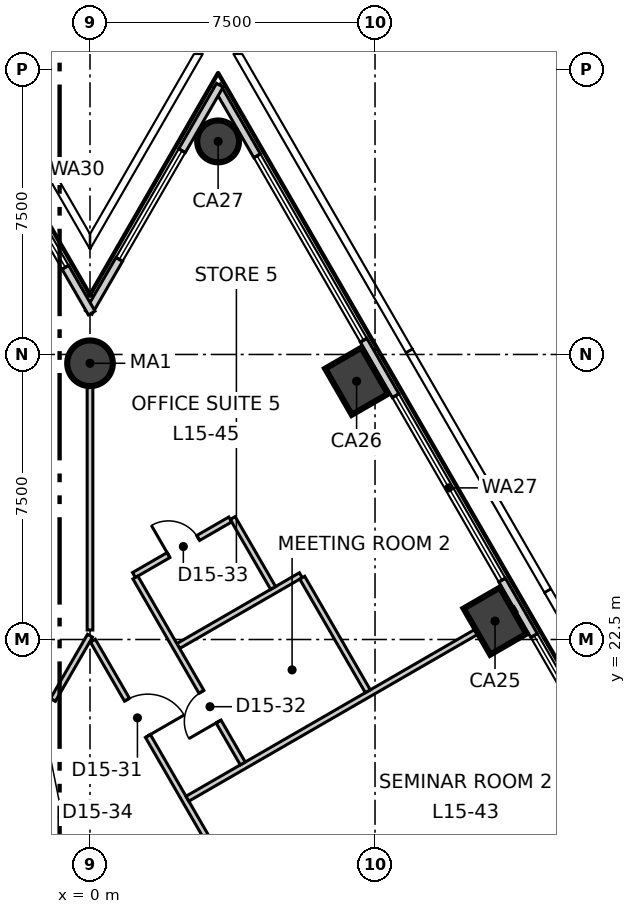
"""IFC4 building model, lengths in metres.
Left out: names, types, materials, properties, quantities, classifications, styles, units other than length and angle.
Written with IfcOpenShell. Run it as: python <this file> out.ifc"""

import sys

from ifc_helpers import new_model, si_unit, direction, frame, frame_2d, origin, origin_2d, place, context, subcontext, project, spatial, rectangle, circle, extrude, element, fill, save


model = new_model("IFC4")
c1 = context("Model", 3, precision=1e-05, world=origin(), true_north=direction((0.0, 1.0)))
c2 = subcontext(c1, "Body", "Model", "MODEL_VIEW")
j1 = project(units=[si_unit("LENGTHUNIT", "METRE"), si_unit("PLANEANGLEUNIT", "RADIAN")], contexts=[c1])
p1 = place(None, origin())
s1 = spatial("IfcSite", under=j1, at=p1, CompositionType="ELEMENT")
p2 = place(p1, origin())
s2 = spatial("IfcBuilding", under=s1, at=p2, CompositionType="ELEMENT")
p3 = place(p2, frame((0.0, 0.0, 71.3)))
s3 = spatial("IfcBuildingStorey", under=s2, at=p3, CompositionType="ELEMENT", Elevation=71.3)
for number, where, z_axis, x_axis in (
    (1, (10.658, 22.984, -0.3), (0.0, 0.0, 1.0), (-0.5, 0.866, 0.0)),
    (2, (7.015, 29.295, -0.3), (0.0, 0.0, 1.0), (-0.5, 0.866, 0.0)),
):
    element("IfcColumn", number, at=place(p3, frame(where, z_axis=z_axis, x_axis=x_axis)), inside=s3, PredefinedType="COLUMN", context=c2, shape_type="SweptSolid", body=[
        extrude(rectangle(XDim=1.4, YDim=1.1, at=origin_2d()), origin(), (0.0, 0.0, 1.0), 4.0),
    ])
p4 = place(p3, frame((3.371, 35.606, -0.3), z_axis=(0.0, 0.0, 1.0), x_axis=(-0.5, 0.866025403784, 0.0)))
e3 = element("IfcColumn", 3, at=p4, inside=s3, PredefinedType="COLUMN", context=c2, shape_type="SweptSolid", body=[
    extrude(circle(Radius=0.55, at=origin_2d()), origin(), (0.0, 0.0, 1.0), 4.0),
])
p5 = place(p3, frame((0.0, 29.768, -0.3), z_axis=(0.0, 0.0, 1.0), x_axis=(1.0, 0.0, 0.0)))
e4 = element("IfcColumn", 4, at=p5, inside=s3, PredefinedType="COLUMN", context=c2, shape_type="SweptSolid", body=[
    extrude(circle(Radius=0.6, at=origin_2d()), origin(), (0.0, 0.0, 1.0), 4.0),
])
p6 = place(p3, frame((33.779, -15.662, 0.0), z_axis=(0.0, 0.0, 1.0), x_axis=(-0.500000131003, 0.86602532815, 0.0)))
e5 = element("IfcWall", 5, at=p6, inside=s3, PredefinedType="ELEMENTEDWALL", context=c2, shape_type="SweptSolid", body=[
    extrude(rectangle(XDim=60.886, YDim=0.2, at=frame_2d((30.443, 0.0))), origin(), (0.0, 0.0, 1.0), 3.7),
])
p7 = place(p6, frame((2.147, 0.0, 0.9)))
e6 = element("IfcOpeningElement", 6, at=p7, cuts=e5, PredefinedType="OPENING", context=c2, shape_type="SweptSolid", body=[
    extrude(rectangle(XDim=5.6, YDim=2.5, at=frame_2d((2.8, 1.25))), frame((0.0, 0.11, 0.0), z_axis=(0.0, -1.0, 0.0), x_axis=(1.0, 0.0, 0.0)), (0.0, 0.0, 1.0), 0.22),
])
p8 = place(p6, frame((9.434, 0.0, 0.9)))
e7 = element("IfcOpeningElement", 7, at=p8, cuts=e5, PredefinedType="OPENING", context=c2, shape_type="SweptSolid", body=[
    extrude(rectangle(XDim=5.6, YDim=2.5, at=frame_2d((2.8, 1.25))), frame((0.0, 0.11, 0.0), z_axis=(0.0, -1.0, 0.0), x_axis=(1.0, 0.0, 0.0)), (0.0, 0.0, 1.0), 0.22),
])
p9 = place(p6, frame((16.722, 0.0, 0.9)))
e8 = element("IfcOpeningElement", 8, at=p9, cuts=e5, PredefinedType="OPENING", context=c2, shape_type="SweptSolid", body=[
    extrude(rectangle(XDim=5.6, YDim=2.5, at=frame_2d((2.8, 1.25))), frame((0.0, 0.11, 0.0), z_axis=(0.0, -1.0, 0.0), x_axis=(1.0, 0.0, 0.0)), (0.0, 0.0, 1.0), 0.22),
])
p10 = place(p6, frame((24.009, 0.0, 0.9)))
e9 = element("IfcOpeningElement", 9, at=p10, cuts=e5, PredefinedType="OPENING", context=c2, shape_type="SweptSolid", body=[
    extrude(rectangle(XDim=5.6, YDim=2.5, at=frame_2d((2.8, 1.25))), frame((0.0, 0.11, 0.0), z_axis=(0.0, -1.0, 0.0), x_axis=(1.0, 0.0, 0.0)), (0.0, 0.0, 1.0), 0.22),
])
p11 = place(p6, frame((31.297, 0.0, 0.9)))
e10 = element("IfcOpeningElement", 10, at=p11, cuts=e5, PredefinedType="OPENING", context=c2, shape_type="SweptSolid", body=[
    extrude(rectangle(XDim=5.6, YDim=2.5, at=frame_2d((2.8, 1.25))), frame((0.0, 0.11, 0.0), z_axis=(0.0, -1.0, 0.0), x_axis=(1.0, 0.0, 0.0)), (0.0, 0.0, 1.0), 0.22),
])
p12 = place(p6, frame((38.584, 0.0, 0.9)))
e11 = element("IfcOpeningElement", 11, at=p12, cuts=e5, PredefinedType="OPENING", context=c2, shape_type="SweptSolid", body=[
    extrude(rectangle(XDim=5.6, YDim=2.5, at=frame_2d((2.8, 1.25))), frame((0.0, 0.11, 0.0), z_axis=(0.0, -1.0, 0.0), x_axis=(1.0, 0.0, 0.0)), (0.0, 0.0, 1.0), 0.22),
])
p13 = place(p6, frame((45.872, 0.0, 0.9)))
e12 = element("IfcOpeningElement", 12, at=p13, cuts=e5, PredefinedType="OPENING", context=c2, shape_type="SweptSolid", body=[
    extrude(rectangle(XDim=5.6, YDim=2.5, at=frame_2d((2.8, 1.25))), frame((0.0, 0.11, 0.0), z_axis=(0.0, -1.0, 0.0), x_axis=(1.0, 0.0, 0.0)), (0.0, 0.0, 1.0), 0.22),
])
p14 = place(p6, frame((53.16, 0.0, 0.9)))
e13 = element("IfcOpeningElement", 13, at=p14, cuts=e5, PredefinedType="OPENING", context=c2, shape_type="SweptSolid", body=[
    extrude(rectangle(XDim=5.6, YDim=2.5, at=frame_2d((2.8, 1.25))), frame((0.0, 0.11, 0.0), z_axis=(0.0, -1.0, 0.0), x_axis=(1.0, 0.0, 0.0)), (0.0, 0.0, 1.0), 0.22),
])
p15 = place(p3, frame((3.416, 37.084, 0.0), z_axis=(0.0, 0.0, 1.0), x_axis=(-0.500008243208, -0.866020644514, 0.0)))
e14 = element("IfcWall", 14, at=p15, inside=s3, PredefinedType="ELEMENTEDWALL", context=c2, shape_type="SweptSolid", body=[
    extrude(rectangle(XDim=6.902, YDim=0.2, at=frame_2d((3.451, 0.0))), origin(), (0.0, 0.0, 1.0), 3.7),
])
p16 = place(p15, frame((1.99, 0.0, 0.9)))
e15 = element("IfcOpeningElement", 15, at=p16, cuts=e14, PredefinedType="OPENING", context=c2, shape_type="SweptSolid", body=[
    extrude(rectangle(XDim=3.3, YDim=2.5, at=frame_2d((1.65, 1.25))), frame((0.0, 0.11, 0.0), z_axis=(0.0, -1.0, 0.0), x_axis=(1.0, 0.0, 0.0)), (0.0, 0.0, 1.0), 0.22),
])
p17 = place(p3, frame((0.045, 31.09, 0.0), z_axis=(0.0, 0.0, 1.0), x_axis=(-0.500023561059, 0.866011800373, 0.0)))
e16 = element("IfcWall", 16, at=p17, inside=s3, PredefinedType="ELEMENTEDWALL", context=c2, shape_type="SweptSolid", body=[
    extrude(rectangle(XDim=6.902, YDim=0.2, at=frame_2d((3.451, 0.0))), origin(), (0.0, 0.0, 1.0), 3.7),
])
p18 = place(p17, frame((1.39, 0.0, 0.9)))
e17 = element("IfcOpeningElement", 17, at=p18, cuts=e16, PredefinedType="OPENING", context=c2, shape_type="SweptSolid", body=[
    extrude(rectangle(XDim=3.3, YDim=2.5, at=frame_2d((1.65, 1.25))), frame((0.0, 0.11, 0.0), z_axis=(0.0, -1.0, 0.0), x_axis=(1.0, 0.0, 0.0)), (0.0, 0.0, 1.0), 0.22),
])
p19 = place(p3, frame((-19.497, -11.17, 0.0), z_axis=(0.0, 0.0, 1.0), x_axis=(0.499998854553, 0.866026065108, 0.0)))
e18 = element("IfcWall", 18, at=p19, inside=s3, PredefinedType="PARTITIONING", context=c2, shape_type="SweptSolid", body=[
    extrude(rectangle(XDim=38.994, YDim=0.15, at=frame_2d((19.497, 0.0))), origin(), (0.0, 0.0, 1.0), 3.7),
])
p20 = place(p19, frame((35.944, 0.0, 0.0)))
e19 = element("IfcOpeningElement", 19, at=p20, cuts=e18, PredefinedType="OPENING", context=c2, shape_type="SweptSolid", body=[
    extrude(rectangle(XDim=1.1, YDim=2.1, at=frame_2d((0.55, 1.05))), frame((0.0, 0.085, 0.0), z_axis=(0.0, -1.0, 0.0), x_axis=(1.0, 0.0, 0.0)), (0.0, 0.0, 1.0), 0.17),
])
p21 = place(p19, frame((26.148, 0.0, 0.0)))
e20 = element("IfcOpeningElement", 20, at=p21, cuts=e18, PredefinedType="OPENING", context=c2, shape_type="SweptSolid", body=[
    extrude(rectangle(XDim=1.1, YDim=2.1, at=frame_2d((0.55, 1.05))), frame((0.0, 0.085, 0.0), z_axis=(0.0, -1.0, 0.0), x_axis=(1.0, 0.0, 0.0)), (0.0, 0.0, 1.0), 0.17),
])
p22 = place(p19, frame((8.572, 0.0, 0.0)))
e21 = element("IfcOpeningElement", 21, at=p22, cuts=e18, PredefinedType="OPENING", context=c2, shape_type="SweptSolid", body=[
    extrude(rectangle(XDim=1.1, YDim=2.1, at=frame_2d((0.55, 1.05))), frame((0.0, 0.085, 0.0), z_axis=(0.0, -1.0, 0.0), x_axis=(1.0, 0.0, 0.0)), (0.0, 0.0, 1.0), 0.17),
])
p23 = place(p19, frame((17.172, 0.0, 0.0)))
e22 = element("IfcOpeningElement", 22, at=p23, cuts=e18, PredefinedType="OPENING", context=c2, shape_type="SweptSolid", body=[
    extrude(rectangle(XDim=0.9, YDim=2.1, at=frame_2d((0.45, 1.05))), frame((0.0, 0.085, 0.0), z_axis=(0.0, -1.0, 0.0), x_axis=(1.0, 0.0, 0.0)), (0.0, 0.0, 1.0), 0.17),
])
p24 = place(p19, frame((14.172, 0.0, 0.0)))
e23 = element("IfcOpeningElement", 23, at=p24, cuts=e18, PredefinedType="OPENING", context=c2, shape_type="SweptSolid", body=[
    extrude(rectangle(XDim=0.9, YDim=2.1, at=frame_2d((0.45, 1.05))), frame((0.0, 0.085, 0.0), z_axis=(0.0, -1.0, 0.0), x_axis=(1.0, 0.0, 0.0)), (0.0, 0.0, 1.0), 0.17),
])
p25 = place(p19, frame((1.797, 0.0, 0.0)))
e24 = element("IfcOpeningElement", 24, at=p25, cuts=e18, PredefinedType="OPENING", context=c2, shape_type="SweptSolid", body=[
    extrude(rectangle(XDim=1.1, YDim=2.1, at=frame_2d((0.55, 1.05))), frame((0.0, 0.085, 0.0), z_axis=(0.0, -1.0, 0.0), x_axis=(1.0, 0.0, 0.0)), (0.0, 0.0, 1.0), 0.17),
])
p26 = place(p3, frame((0.0, 22.75, 0.0), z_axis=(0.0, 0.0, 1.0), x_axis=(0.0, 1.0, 0.0)))
e25 = element("IfcWall", 25, at=p26, inside=s3, PredefinedType="PARTITIONING", context=c2, shape_type="SweptSolid", body=[
    extrude(rectangle(XDim=7.638, YDim=0.15, at=frame_2d((3.819, 0.0))), origin(), (0.0, 0.0, 1.0), 3.1),
])
p27 = place(p3, frame((0.075, 22.47, 0.0), z_axis=(0.0, 0.0, 1.0), x_axis=(0.500002280369, -0.866024087209, 0.0)))
e26 = element("IfcWall", 26, at=p27, inside=s3, PredefinedType="PARTITIONING", context=c2, shape_type="SweptSolid", body=[
    extrude(rectangle(XDim=38.844, YDim=0.15, at=frame_2d((19.422, 0.0))), origin(), (0.0, 0.0, 1.0), 3.7),
])
p28 = place(p27, frame((35.944, 0.0, 0.0)))
e27 = element("IfcOpeningElement", 27, at=p28, cuts=e26, PredefinedType="OPENING", context=c2, shape_type="SweptSolid", body=[
    extrude(rectangle(XDim=1.1, YDim=2.1, at=frame_2d((0.55, 1.05))), frame((0.0, 0.085, 0.0), z_axis=(0.0, -1.0, 0.0), x_axis=(1.0, 0.0, 0.0)), (0.0, 0.0, 1.0), 0.17),
])
p29 = place(p27, frame((29.848, 0.0, 0.0)))
e28 = element("IfcOpeningElement", 28, at=p29, cuts=e26, PredefinedType="OPENING", context=c2, shape_type="SweptSolid", body=[
    extrude(rectangle(XDim=1.0, YDim=2.1, at=frame_2d((0.5, 1.05))), frame((0.0, 0.085, 0.0), z_axis=(0.0, -1.0, 0.0), x_axis=(1.0, 0.0, 0.0)), (0.0, 0.0, 1.0), 0.17),
])
p30 = place(p27, frame((14.46, 0.0, 0.0)))
e29 = element("IfcOpeningElement", 29, at=p30, cuts=e26, PredefinedType="OPENING", context=c2, shape_type="SweptSolid", body=[
    extrude(rectangle(XDim=1.1, YDim=2.1, at=frame_2d((0.55, 1.05))), frame((0.0, 0.085, 0.0), z_axis=(0.0, -1.0, 0.0), x_axis=(1.0, 0.0, 0.0)), (0.0, 0.0, 1.0), 0.17),
])
p31 = place(p27, frame((24.66, 0.0, 0.0)))
e30 = element("IfcOpeningElement", 30, at=p31, cuts=e26, PredefinedType="OPENING", context=c2, shape_type="SweptSolid", body=[
    extrude(rectangle(XDim=0.9, YDim=2.1, at=frame_2d((0.45, 1.05))), frame((0.0, 0.085, 0.0), z_axis=(0.0, -1.0, 0.0), x_axis=(1.0, 0.0, 0.0)), (0.0, 0.0, 1.0), 0.17),
])
p32 = place(p27, frame((21.46, 0.0, 0.0)))
e31 = element("IfcOpeningElement", 31, at=p32, cuts=e26, PredefinedType="OPENING", context=c2, shape_type="SweptSolid", body=[
    extrude(rectangle(XDim=0.9, YDim=2.1, at=frame_2d((0.45, 1.05))), frame((0.0, 0.085, 0.0), z_axis=(0.0, -1.0, 0.0), x_axis=(1.0, 0.0, 0.0)), (0.0, 0.0, 1.0), 0.17),
])
p33 = place(p27, frame((18.66, 0.0, 0.0)))
e32 = element("IfcOpeningElement", 32, at=p33, cuts=e26, PredefinedType="OPENING", context=c2, shape_type="SweptSolid", body=[
    extrude(rectangle(XDim=1.0, YDim=2.1, at=frame_2d((0.5, 1.05))), frame((0.0, 0.085, 0.0), z_axis=(0.0, -1.0, 0.0), x_axis=(1.0, 0.0, 0.0)), (0.0, 0.0, 1.0), 0.17),
])
p34 = place(p27, frame((6.785, 0.0, 0.0)))
e33 = element("IfcOpeningElement", 33, at=p34, cuts=e26, PredefinedType="OPENING", context=c2, shape_type="SweptSolid", body=[
    extrude(rectangle(XDim=1.0, YDim=2.1, at=frame_2d((0.5, 1.05))), frame((0.0, 0.085, 0.0), z_axis=(0.0, -1.0, 0.0), x_axis=(1.0, 0.0, 0.0)), (0.0, 0.0, 1.0), 0.17),
])
p35 = place(p27, frame((10.485, 0.0, 0.0)))
e34 = element("IfcOpeningElement", 34, at=p35, cuts=e26, PredefinedType="OPENING", context=c2, shape_type="SweptSolid", body=[
    extrude(rectangle(XDim=0.9, YDim=2.1, at=frame_2d((0.45, 1.05))), frame((0.0, 0.085, 0.0), z_axis=(0.0, -1.0, 0.0), x_axis=(1.0, 0.0, 0.0)), (0.0, 0.0, 1.0), 0.17),
])
p36 = place(p27, frame((1.796, 0.0, 0.0)))
e35 = element("IfcOpeningElement", 35, at=p36, cuts=e26, PredefinedType="OPENING", context=c2, shape_type="SweptSolid", body=[
    extrude(rectangle(XDim=1.1, YDim=2.1, at=frame_2d((0.55, 1.05))), frame((0.0, 0.085, 0.0), z_axis=(0.0, -1.0, 0.0), x_axis=(1.0, 0.0, 0.0)), (0.0, 0.0, 1.0), 0.17),
])
p37 = place(p3, frame((2.563, 18.31, 0.0), z_axis=(0.0, 0.0, 1.0), x_axis=(0.866018758693, 0.500011509459, 0.0)))
e36 = element("IfcWall", 36, at=p37, inside=s3, PredefinedType="PARTITIONING", context=c2, shape_type="SweptSolid", body=[
    extrude(rectangle(XDim=9.968, YDim=0.15, at=frame_2d((4.984, 0.0))), origin(), (0.0, 0.0, 1.0), 3.7),
])
p38 = place(p3, frame((2.322, 22.328, 0.0), z_axis=(0.0, 0.0, 1.0), x_axis=(0.865971665278, 0.500093066274, 0.0)))
e37 = element("IfcWall", 37, at=p38, inside=s3, PredefinedType="PARTITIONING", context=c2, shape_type="SweptSolid", body=[
    extrude(rectangle(XDim=3.725, YDim=0.15, at=frame_2d((1.863, 0.0))), origin(), (0.0, 0.0, 1.0), 3.7),
])
p39 = place(p3, frame((3.755, 25.696, 0.0), z_axis=(0.0, 0.0, 1.0), x_axis=(0.500302479123, -0.865850696935, 0.0)))
e38 = element("IfcWall", 38, at=p39, inside=s3, PredefinedType="PARTITIONING", context=c2, shape_type="SweptSolid", body=[
    extrude(rectangle(XDim=2.125, YDim=0.15, at=frame_2d((1.062, 0.0))), origin(), (0.0, 0.0, 1.0), 3.7),
])
p40 = place(p3, frame((1.157, 24.196, 0.0), z_axis=(0.0, 0.0, 1.0), x_axis=(0.866098016745, 0.499874209568, 0.0)))
e39 = element("IfcWall", 39, at=p40, inside=s3, PredefinedType="PARTITIONING", context=c2, shape_type="SweptSolid", body=[
    extrude(rectangle(XDim=2.925, YDim=0.15, at=frame_2d((1.462, 0.0))), origin(), (0.0, 0.0, 1.0), 3.7),
])
p41 = place(p40, frame((1.05, 0.0, 0.0)))
e40 = element("IfcOpeningElement", 40, at=p41, cuts=e39, PredefinedType="OPENING", context=c2, shape_type="SweptSolid", body=[
    extrude(rectangle(XDim=0.9, YDim=2.1, at=frame_2d((0.45, 1.05))), frame((0.0, 0.085, 0.0), z_axis=(0.0, -1.0, 0.0), x_axis=(1.0, 0.0, 0.0)), (0.0, 0.0, 1.0), 0.17),
])
p42 = place(p3, frame((1.195, 24.131, 0.0), z_axis=(0.0, 0.0, 1.0), x_axis=(0.499991765245, -0.86603015807, 0.0)))
e41 = element("IfcWall", 41, at=p42, inside=s3, PredefinedType="PARTITIONING", context=c2, shape_type="SweptSolid", body=[
    extrude(rectangle(XDim=5.65, YDim=0.15, at=frame_2d((2.825, 0.0))), origin(), (0.0, 0.0, 1.0), 3.7),
])
p43 = place(p42, frame((3.475, 0.0, 0.0)))
e42 = element("IfcOpeningElement", 42, at=p43, cuts=e41, PredefinedType="OPENING", context=c2, shape_type="SweptSolid", body=[
    extrude(rectangle(XDim=0.9, YDim=2.1, at=frame_2d((0.45, 1.05))), frame((0.0, 0.085, 0.0), z_axis=(0.0, -1.0, 0.0), x_axis=(1.0, 0.0, 0.0)), (0.0, 0.0, 1.0), 0.17),
])
p44 = place(p3, frame((5.585, 24.126, 0.0), z_axis=(0.0, 0.0, 1.0), x_axis=(0.49998991961, -0.866031223622, 0.0)))
e43 = element("IfcWall", 43, at=p44, inside=s3, PredefinedType="PARTITIONING", context=c2, shape_type="SweptSolid", body=[
    extrude(rectangle(XDim=3.45, YDim=0.15, at=frame_2d((1.725, 0.0))), origin(), (0.0, 0.0, 1.0), 3.7),
])
p45 = place(p12, origin())
e44 = element("IfcWindow", 44, at=p45, inside=s3, PartitioningType="SINGLE_PANEL", PredefinedType="WINDOW", context=c2, shape_type="SweptSolid", body=[
    extrude(rectangle(XDim=5.6, YDim=2.5, at=frame_2d((2.8, 1.25))), frame((0.0, 0.03, 0.0), z_axis=(0.0, -1.0, 0.0), x_axis=(1.0, 0.0, 0.0)), (0.0, 0.0, 1.0), 0.06),
])
fill(e11, e44)
p46 = place(p13, origin())
e45 = element("IfcWindow", 45, at=p46, inside=s3, PartitioningType="SINGLE_PANEL", PredefinedType="WINDOW", context=c2, shape_type="SweptSolid", body=[
    extrude(rectangle(XDim=5.6, YDim=2.5, at=frame_2d((2.8, 1.25))), frame((0.0, 0.03, 0.0), z_axis=(0.0, -1.0, 0.0), x_axis=(1.0, 0.0, 0.0)), (0.0, 0.0, 1.0), 0.06),
])
fill(e12, e45)
p47 = place(p14, origin())
e46 = element("IfcWindow", 46, at=p47, inside=s3, PartitioningType="SINGLE_PANEL", PredefinedType="WINDOW", context=c2, shape_type="SweptSolid", body=[
    extrude(rectangle(XDim=5.6, YDim=2.5, at=frame_2d((2.8, 1.25))), frame((0.0, 0.03, 0.0), z_axis=(0.0, -1.0, 0.0), x_axis=(1.0, 0.0, 0.0)), (0.0, 0.0, 1.0), 0.06),
])
fill(e13, e46)
p48 = place(p16, origin())
e47 = element("IfcWindow", 47, at=p48, inside=s3, PartitioningType="SINGLE_PANEL", PredefinedType="WINDOW", context=c2, shape_type="SweptSolid", body=[
    extrude(rectangle(XDim=3.3, YDim=2.5, at=frame_2d((1.65, 1.25))), frame((0.0, 0.03, 0.0), z_axis=(0.0, -1.0, 0.0), x_axis=(1.0, 0.0, 0.0)), (0.0, 0.0, 1.0), 0.06),
])
fill(e15, e47)
p49 = place(p18, origin())
e48 = element("IfcWindow", 48, at=p49, inside=s3, PartitioningType="SINGLE_PANEL", PredefinedType="WINDOW", context=c2, shape_type="SweptSolid", body=[
    extrude(rectangle(XDim=3.3, YDim=2.5, at=frame_2d((1.65, 1.25))), frame((0.0, 0.03, 0.0), z_axis=(0.0, -1.0, 0.0), x_axis=(1.0, 0.0, 0.0)), (0.0, 0.0, 1.0), 0.06),
])
fill(e17, e48)
p50 = place(p36, origin())
e49 = element("IfcDoor", 49, at=p50, inside=s3, OperationType="SINGLE_SWING_LEFT", PredefinedType="DOOR", context=c2, shape_type="SweptSolid", body=[
    extrude(rectangle(XDim=1.1, YDim=2.1, at=frame_2d((0.55, 1.05))), frame((0.0, 0.025, 0.0), z_axis=(0.0, -1.0, 0.0), x_axis=(1.0, 0.0, 0.0)), (0.0, 0.0, 1.0), 0.05),
])
fill(e35, e49)
p51 = place(p43, origin())
e50 = element("IfcDoor", 50, at=p51, inside=s3, OperationType="SINGLE_SWING_RIGHT", PredefinedType="DOOR", context=c2, shape_type="SweptSolid", body=[
    extrude(rectangle(XDim=0.9, YDim=2.1, at=frame_2d((0.45, 1.05))), frame((0.0, 0.025, 0.0), z_axis=(0.0, -1.0, 0.0), x_axis=(1.0, 0.0, 0.0)), (0.0, 0.0, 1.0), 0.05),
])
fill(e42, e50)
p52 = place(p41, origin())
e51 = element("IfcDoor", 51, at=p52, inside=s3, OperationType="SINGLE_SWING_RIGHT", PredefinedType="DOOR", context=c2, shape_type="SweptSolid", body=[
    extrude(rectangle(XDim=0.9, YDim=2.1, at=frame_2d((0.45, 1.05))), frame((0.0, 0.025, 0.0), z_axis=(0.0, -1.0, 0.0), x_axis=(1.0, 0.0, 0.0)), (0.0, 0.0, 1.0), 0.05),
])
fill(e40, e51)
p53 = place(p20, origin())
e52 = element("IfcDoor", 52, at=p53, inside=s3, OperationType="SINGLE_SWING_RIGHT", PredefinedType="DOOR", context=c2, shape_type="SweptSolid", body=[
    extrude(rectangle(XDim=1.1, YDim=2.1, at=frame_2d((0.55, 1.05))), frame((0.0, 0.025, 0.0), z_axis=(0.0, -1.0, 0.0), x_axis=(1.0, 0.0, 0.0)), (0.0, 0.0, 1.0), 0.05),
])
fill(e19, e52)
save(model, sys.argv[1])
